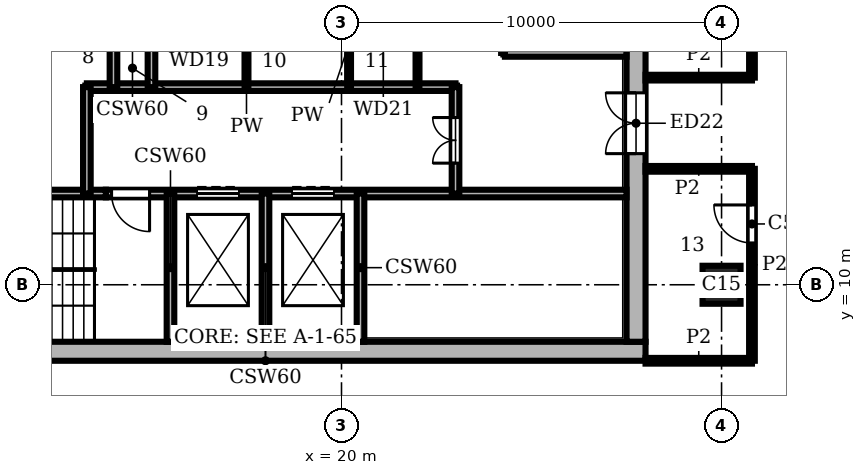
"""IFC4 building model, lengths in metres.
Left out: names, types, materials, properties, quantities, classifications, styles, units other than length and angle.
Written with IfcOpenShell. Run it as: python <this file> out.ifc"""

import sys

from ifc_helpers import new_model, si_unit, direction, frame, frame_2d, origin, origin_2d, place, context, subcontext, project, spatial, rectangle, extrude, element, fill, save


model = new_model("IFC4")
c1 = context("Model", 3, precision=1e-05, world=origin(), true_north=direction((0.0, 1.0)))
c2 = subcontext(c1, "Body", "Model", "MODEL_VIEW")
j1 = project(units=[si_unit("LENGTHUNIT", "METRE"), si_unit("PLANEANGLEUNIT", "RADIAN")], contexts=[c1])
p1 = place(None, origin())
s1 = spatial("IfcSite", under=j1, at=p1, CompositionType="ELEMENT")
p2 = place(p1, origin())
s2 = spatial("IfcBuilding", under=s1, at=p2, CompositionType="ELEMENT")
p3 = place(p2, frame((0.0, 0.0, 290.4)))
s3 = spatial("IfcBuildingStorey", under=s2, at=p3, CompositionType="ELEMENT", Elevation=290.4)
p4 = place(p3, frame((30.0, 10.0, 0.0), z_axis=(0.0, 0.0, 1.0), x_axis=(1.0, 0.0, 0.0)))
e1 = element("IfcColumn", 1, at=p4, inside=s3, PredefinedType="COLUMN", context=c2, shape_type="SweptSolid", body=[
    extrude(rectangle(XDim=1.0, YDim=1.0, at=origin_2d()), origin(), (0.0, 0.0, 1.0), 3.9),
])
p5 = place(p3, frame((8.0, 8.25, 0.0), z_axis=(0.0, 0.0, 1.0), x_axis=(1.0, 0.0, 0.0)))
e2 = element("IfcWall", 2, at=p5, inside=s3, PredefinedType="SHEAR", context=c2, shape_type="SweptSolid", body=[
    extrude(rectangle(XDim=20.0, YDim=0.5, at=frame_2d((10.0, 0.0))), origin(), (0.0, 0.0, 1.0), 3.9),
])
p6 = place(p3, frame((27.75, 8.5, 0.0), z_axis=(0.0, 0.0, 1.0), x_axis=(0.0, 1.0, 0.0)))
e3 = element("IfcWall", 3, at=p6, inside=s3, PredefinedType="SHEAR", context=c2, shape_type="SweptSolid", body=[
    extrude(rectangle(XDim=19.0, YDim=0.5, at=frame_2d((9.5, 0.0))), origin(), (0.0, 0.0, 1.0), 3.9),
])
p7 = place(p6, frame((4.95, 0.0, 0.0)))
e4 = element("IfcOpeningElement", 4, at=p7, cuts=e3, PredefinedType="OPENING", context=c2, shape_type="SweptSolid", body=[
    extrude(rectangle(XDim=1.6, YDim=2.1, at=frame_2d((0.8, 1.05))), frame((0.0, 0.26, 0.0), z_axis=(0.0, -1.0, 0.0), x_axis=(1.0, 0.0, 0.0)), (0.0, 0.0, 1.0), 0.52),
])
p8 = place(p3, frame((8.5, 12.4, 0.0), z_axis=(0.0, 0.0, 1.0), x_axis=(1.0, 0.0, 0.0)))
e5 = element("IfcWall", 5, at=p8, inside=s3, PredefinedType="SHEAR", context=c2, shape_type="SweptSolid", body=[
    extrude(rectangle(XDim=5.3, YDim=0.2, at=frame_2d((2.65, 0.0))), origin(), (0.0, 0.0, 1.0), 3.58),
])
p9 = place(p3, frame((13.8, 12.4, 0.0), z_axis=(0.0, 0.0, 1.0), x_axis=(1.0, 0.0, 0.0)))
e6 = element("IfcWall", 6, at=p9, inside=s3, PredefinedType="SHEAR", context=c2, shape_type="SweptSolid", body=[
    extrude(rectangle(XDim=13.7, YDim=0.2, at=frame_2d((6.85, 0.0))), origin(), (0.0, 0.0, 1.0), 3.58),
])
p10 = place(p9, frame((2.4, 0.0, 0.0)))
e7 = element("IfcOpeningElement", 7, at=p10, cuts=e6, PredefinedType="OPENING", context=c2, shape_type="SweptSolid", body=[
    extrude(rectangle(XDim=1.1, YDim=2.1, at=frame_2d((0.55, 1.05))), frame((0.0, 0.11, 0.0), z_axis=(0.0, -1.0, 0.0), x_axis=(1.0, 0.0, 0.0)), (0.0, 0.0, 1.0), 0.22),
])
p11 = place(p9, frame((4.9, 0.0, 0.0)))
e8 = element("IfcOpeningElement", 8, at=p11, cuts=e6, PredefinedType="OPENING", context=c2, shape_type="SweptSolid", body=[
    extrude(rectangle(XDim=1.1, YDim=2.1, at=frame_2d((0.55, 1.05))), frame((0.0, 0.11, 0.0), z_axis=(0.0, -1.0, 0.0), x_axis=(1.0, 0.0, 0.0)), (0.0, 0.0, 1.0), 0.22),
])
p12 = place(p9, frame((0.15, 0.0, 0.0)))
e9 = element("IfcOpeningElement", 9, at=p12, cuts=e6, PredefinedType="OPENING", context=c2, shape_type="SweptSolid", body=[
    extrude(rectangle(XDim=1.0, YDim=2.1, at=frame_2d((0.5, 1.05))), frame((0.0, 0.11, 0.0), z_axis=(0.0, -1.0, 0.0), x_axis=(1.0, 0.0, 0.0)), (0.0, 0.0, 1.0), 0.22),
])
p13 = place(p3, frame((13.3, 15.2, 0.0), z_axis=(0.0, 0.0, 1.0), x_axis=(1.0, 0.0, 0.0)))
e10 = element("IfcWall", 10, at=p13, inside=s3, PredefinedType="SHEAR", context=c2, shape_type="SweptSolid", body=[
    extrude(rectangle(XDim=9.7, YDim=0.2, at=frame_2d((4.85, 0.0))), origin(), (0.0, 0.0, 1.0), 3.58),
])
p14 = place(p3, frame((24.3, 16.1, 0.0), z_axis=(0.0, 0.0, 1.0), x_axis=(1.0, 0.0, 0.0)))
e11 = element("IfcWall", 11, at=p14, inside=s3, PredefinedType="SHEAR", context=c2, shape_type="SweptSolid", body=[
    extrude(rectangle(XDim=3.2, YDim=0.2, at=frame_2d((1.6, 0.0))), origin(), (0.0, 0.0, 1.0), 3.58),
])
p15 = place(p3, frame((13.3, 12.4, 0.0), z_axis=(0.0, 0.0, 1.0), x_axis=(0.0, 1.0, 0.0)))
e12 = element("IfcWall", 12, at=p15, inside=s3, PredefinedType="SHEAR", context=c2, shape_type="SweptSolid", body=[
    extrude(rectangle(XDim=2.8, YDim=0.2, at=frame_2d((1.4, 0.0))), origin(), (0.0, 0.0, 1.0), 3.58),
])
for number, where, z_axis, x_axis in (
    (13, (14.0, 15.2, 0.0), (0.0, 0.0, 1.0), (0.0, 1.0, 0.0)),
    (14, (15.0, 15.2, 0.0), (0.0, 0.0, 1.0), (0.0, 1.0, 0.0)),
):
    element("IfcWall", number, at=place(p3, frame(where, z_axis=z_axis, x_axis=x_axis)), inside=s3, PredefinedType="SHEAR", context=c2, shape_type="SweptSolid", body=[
        extrude(rectangle(XDim=2.3, YDim=0.2, at=frame_2d((1.15, 0.0))), origin(), (0.0, 0.0, 1.0), 3.58),
    ])
p16 = place(p3, frame((15.5, 8.5, 0.0), z_axis=(0.0, 0.0, 1.0), x_axis=(0.0, 1.0, 0.0)))
e15 = element("IfcWall", 15, at=p16, inside=s3, PredefinedType="SHEAR", context=c2, shape_type="SweptSolid", body=[
    extrude(rectangle(XDim=3.9, YDim=0.2, at=frame_2d((1.95, 0.0))), origin(), (0.0, 0.0, 1.0), 3.58),
])
p17 = place(p3, frame((17.5, 15.2, 0.0), z_axis=(0.0, 0.0, 1.0), x_axis=(0.0, 1.0, 0.0)))
e16 = element("IfcWall", 16, at=p17, inside=s3, PredefinedType="PARTITIONING", context=c2, shape_type="SweptSolid", body=[
    extrude(rectangle(XDim=2.3, YDim=0.1, at=frame_2d((1.15, 0.0))), origin(), (0.0, 0.0, 1.0), 3.58),
])
p18 = place(p3, frame((18.0, 8.5, 0.0), z_axis=(0.0, 0.0, 1.0), x_axis=(0.0, 1.0, 0.0)))
e17 = element("IfcWall", 17, at=p18, inside=s3, PredefinedType="SHEAR", context=c2, shape_type="SweptSolid", body=[
    extrude(rectangle(XDim=3.9, YDim=0.2, at=frame_2d((1.95, 0.0))), origin(), (0.0, 0.0, 1.0), 3.58),
])
p19 = place(p3, frame((20.2, 15.2, 0.0), z_axis=(0.0, 0.0, 1.0), x_axis=(0.0, 1.0, 0.0)))
e18 = element("IfcWall", 18, at=p19, inside=s3, PredefinedType="PARTITIONING", context=c2, shape_type="SweptSolid", body=[
    extrude(rectangle(XDim=2.3, YDim=0.1, at=frame_2d((1.15, 0.0))), origin(), (0.0, 0.0, 1.0), 3.58),
])
p20 = place(p3, frame((20.5, 8.5, 0.0), z_axis=(0.0, 0.0, 1.0), x_axis=(0.0, 1.0, 0.0)))
e19 = element("IfcWall", 19, at=p20, inside=s3, PredefinedType="SHEAR", context=c2, shape_type="SweptSolid", body=[
    extrude(rectangle(XDim=3.9, YDim=0.2, at=frame_2d((1.95, 0.0))), origin(), (0.0, 0.0, 1.0), 3.58),
])
p21 = place(p3, frame((22.0, 15.2, 0.0), z_axis=(0.0, 0.0, 1.0), x_axis=(0.0, 1.0, 0.0)))
e20 = element("IfcWall", 20, at=p21, inside=s3, PredefinedType="PARTITIONING", context=c2, shape_type="SweptSolid", body=[
    extrude(rectangle(XDim=3.8, YDim=0.1, at=frame_2d((1.9, 0.0))), origin(), (0.0, 0.0, 1.0), 3.58),
])
p22 = place(p3, frame((23.0, 12.4, 0.0), z_axis=(0.0, 0.0, 1.0), x_axis=(0.0, 1.0, 0.0)))
e21 = element("IfcWall", 21, at=p22, inside=s3, PredefinedType="SHEAR", context=c2, shape_type="SweptSolid", body=[
    extrude(rectangle(XDim=2.8, YDim=0.2, at=frame_2d((1.4, 0.0))), origin(), (0.0, 0.0, 1.0), 3.58),
])
p23 = place(p22, frame((0.8, 0.0, 0.0)))
e22 = element("IfcOpeningElement", 22, at=p23, cuts=e21, PredefinedType="OPENING", context=c2, shape_type="SweptSolid", body=[
    extrude(rectangle(XDim=1.2, YDim=2.1, at=frame_2d((0.6, 1.05))), frame((0.0, 0.11, 0.0), z_axis=(0.0, -1.0, 0.0), x_axis=(1.0, 0.0, 0.0)), (0.0, 0.0, 1.0), 0.22),
])
p24 = place(p3, frame((30.8, 8.0, 0.0), z_axis=(0.0, 0.0, 1.0), x_axis=(0.0, 1.0, 0.0)))
e23 = element("IfcWall", 23, at=p24, inside=s3, PredefinedType="PARTITIONING", context=c2, shape_type="SweptSolid", body=[
    extrude(rectangle(XDim=5.05, YDim=0.15, at=frame_2d((2.525, 0.0))), origin(), (0.0, 0.0, 1.0), 3.58),
])
p25 = place(p24, frame((3.1, 0.0, 0.0)))
e24 = element("IfcOpeningElement", 24, at=p25, cuts=e23, PredefinedType="OPENING", context=c2, shape_type="SweptSolid", body=[
    extrude(rectangle(XDim=1.0, YDim=2.1, at=frame_2d((0.5, 1.05))), frame((0.0, 0.085, 0.0), z_axis=(0.0, -1.0, 0.0), x_axis=(1.0, 0.0, 0.0)), (0.0, 0.0, 1.0), 0.17),
])
p26 = place(p3, frame((30.8, 15.45, 0.0), z_axis=(0.0, 0.0, 1.0), x_axis=(0.0, 1.0, 0.0)))
e25 = element("IfcWall", 25, at=p26, inside=s3, PredefinedType="PARTITIONING", context=c2, shape_type="SweptSolid", body=[
    extrude(rectangle(XDim=15.15, YDim=0.15, at=frame_2d((7.575, 0.0))), origin(), (0.0, 0.0, 1.0), 3.58),
])
p27 = place(p26, frame((8.6, 0.0, 0.0)))
e26 = element("IfcOpeningElement", 26, at=p27, cuts=e25, PredefinedType="OPENING", context=c2, shape_type="SweptSolid", body=[
    extrude(rectangle(XDim=1.0, YDim=2.1, at=frame_2d((0.5, 1.05))), frame((0.0, 0.085, 0.0), z_axis=(0.0, -1.0, 0.0), x_axis=(1.0, 0.0, 0.0)), (0.0, 0.0, 1.0), 0.17),
])
for number, where, z_axis, x_axis in (
    (27, (28.0, 8.0, 0.0), (0.0, 0.0, 1.0), (1.0, 0.0, 0.0)),
    (28, (28.0, 13.05, 0.0), (0.0, 0.0, 1.0), (1.0, 0.0, 0.0)),
    (29, (28.0, 15.45, 0.0), (0.0, 0.0, 1.0), (1.0, 0.0, 0.0)),
):
    element("IfcWall", number, at=place(p3, frame(where, z_axis=z_axis, x_axis=x_axis)), inside=s3, PredefinedType="PARTITIONING", context=c2, shape_type="SweptSolid", body=[
        extrude(rectangle(XDim=2.8, YDim=0.15, at=frame_2d((1.4, 0.0))), origin(), (0.0, 0.0, 1.0), 3.58),
    ])
p28 = place(p10, origin())
e30 = element("IfcDoor", 30, at=p28, inside=s3, OperationType="DOUBLE_DOOR_SLIDING", PredefinedType="DOOR", context=c2, shape_type="SweptSolid", body=[
    extrude(rectangle(XDim=1.1, YDim=2.1, at=frame_2d((0.55, 1.05))), frame((0.0, 0.025, 0.0), z_axis=(0.0, -1.0, 0.0), x_axis=(1.0, 0.0, 0.0)), (0.0, 0.0, 1.0), 0.05),
])
fill(e7, e30)
p29 = place(p11, origin())
e31 = element("IfcDoor", 31, at=p29, inside=s3, OperationType="DOUBLE_DOOR_SLIDING", PredefinedType="DOOR", context=c2, shape_type="SweptSolid", body=[
    extrude(rectangle(XDim=1.1, YDim=2.1, at=frame_2d((0.55, 1.05))), frame((0.0, 0.025, 0.0), z_axis=(0.0, -1.0, 0.0), x_axis=(1.0, 0.0, 0.0)), (0.0, 0.0, 1.0), 0.05),
])
fill(e8, e31)
p30 = place(p12, frame((1.0, 0.0, 0.0), z_axis=(0.0, 0.0, 1.0), x_axis=(-1.0, 0.0, 0.0)))
e32 = element("IfcDoor", 32, at=p30, inside=s3, OperationType="SINGLE_SWING_LEFT", PredefinedType="DOOR", context=c2, shape_type="SweptSolid", body=[
    extrude(rectangle(XDim=1.0, YDim=2.1, at=frame_2d((0.5, 1.05))), frame((0.0, 0.025, 0.0), z_axis=(0.0, -1.0, 0.0), x_axis=(1.0, 0.0, 0.0)), (0.0, 0.0, 1.0), 0.05),
])
fill(e9, e32)
p31 = place(p23, origin())
e33 = element("IfcDoor", 33, at=p31, inside=s3, OperationType="DOUBLE_DOOR_SINGLE_SWING", PredefinedType="DOOR", context=c2, shape_type="SweptSolid", body=[
    extrude(rectangle(XDim=1.2, YDim=2.1, at=frame_2d((0.6, 1.05))), frame((0.0, 0.025, 0.0), z_axis=(0.0, -1.0, 0.0), x_axis=(1.0, 0.0, 0.0)), (0.0, 0.0, 1.0), 0.05),
])
fill(e22, e33)
p32 = place(p7, origin())
e34 = element("IfcDoor", 34, at=p32, inside=s3, OperationType="DOUBLE_DOOR_SINGLE_SWING", PredefinedType="DOOR", context=c2, shape_type="SweptSolid", body=[
    extrude(rectangle(XDim=1.6, YDim=2.1, at=frame_2d((0.8, 1.05))), frame((0.0, 0.025, 0.0), z_axis=(0.0, -1.0, 0.0), x_axis=(1.0, 0.0, 0.0)), (0.0, 0.0, 1.0), 0.05),
])
fill(e4, e34)
p33 = place(p25, origin())
e35 = element("IfcDoor", 35, at=p33, inside=s3, OperationType="SINGLE_SWING_RIGHT", PredefinedType="DOOR", context=c2, shape_type="SweptSolid", body=[
    extrude(rectangle(XDim=1.0, YDim=2.1, at=frame_2d((0.5, 1.05))), frame((0.0, 0.025, 0.0), z_axis=(0.0, -1.0, 0.0), x_axis=(1.0, 0.0, 0.0)), (0.0, 0.0, 1.0), 0.05),
])
fill(e24, e35)
save(model, sys.argv[1])
